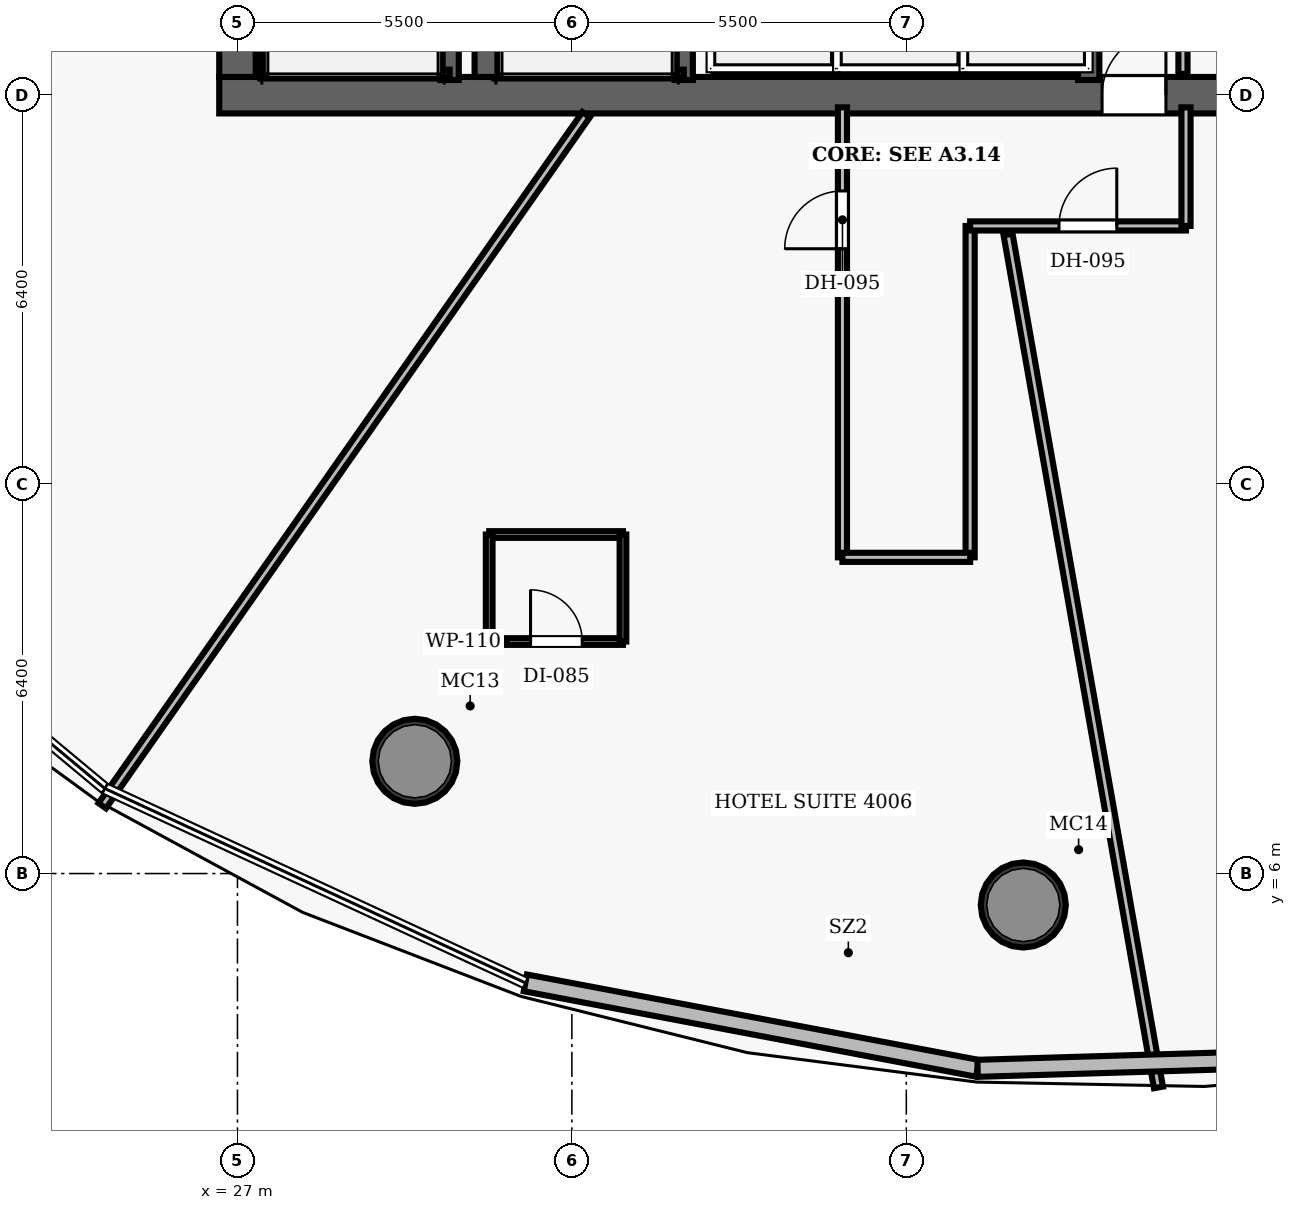
"""IFC4 building model, lengths in metres.
Left out: names, types, materials, properties, quantities, classifications, styles, units other than length and angle.
Written with IfcOpenShell. Run it as: python <this file> out.ifc"""

import sys

from ifc_helpers import new_model, si_unit, direction, frame, frame_2d, origin, origin_2d, place, context, subcontext, project, spatial, rectangle, hollow_circle, extrude, element, fill, save


model = new_model("IFC4")
c1 = context("Model", 3, precision=1e-05, world=origin(), true_north=direction((0.0, 1.0)))
c2 = subcontext(c1, "Body", "Model", "MODEL_VIEW")
j1 = project(units=[si_unit("LENGTHUNIT", "METRE"), si_unit("PLANEANGLEUNIT", "RADIAN")], contexts=[c1])
p1 = place(None, origin())
s1 = spatial("IfcSite", under=j1, at=p1, CompositionType="ELEMENT")
p2 = place(p1, origin())
s2 = spatial("IfcBuilding", under=s1, at=p2, CompositionType="ELEMENT")
p3 = place(p2, frame((0.0, 0.0, 158.8)))
s3 = spatial("IfcBuildingStorey", under=s2, at=p3, CompositionType="ELEMENT", Elevation=158.8)
p4 = place(p3, frame((26.7, 18.8, 0.0), z_axis=(0.0, 0.0, 1.0), x_axis=(1.0, 0.0, 0.0)))
e1 = element("IfcWall", 1, at=p4, inside=s3, PredefinedType="SHEAR", context=c2, shape_type="SweptSolid", body=[
    extrude(rectangle(XDim=22.6, YDim=0.6, at=frame_2d((11.3, 0.0))), origin(), (0.0, 0.0, 1.0), 3.5),
])
p5 = place(p4, frame((14.52, 0.0, 0.0)))
e2 = element("IfcOpeningElement", 2, at=p5, cuts=e1, PredefinedType="OPENING", context=c2, shape_type="SweptSolid", body=[
    extrude(rectangle(XDim=1.05, YDim=2.15, at=frame_2d((0.525, 1.075))), frame((0.0, 0.31, 0.0), z_axis=(0.0, -1.0, 0.0), x_axis=(1.0, 0.0, 0.0)), (0.0, 0.0, 1.0), 0.62),
])
p6 = place(p3, frame((27.0, 19.1, 0.0), z_axis=(0.0, 0.0, 1.0), x_axis=(0.0, 1.0, 0.0)))
e3 = element("IfcWall", 3, at=p6, inside=s3, PredefinedType="SHEAR", context=c2, shape_type="SweptSolid", body=[
    extrude(rectangle(XDim=13.8, YDim=0.6, at=frame_2d((6.9, 0.0))), origin(), (0.0, 0.0, 1.0), 3.5),
])
p7 = place(p6, frame((8.2, 0.0, 0.0)))
e4 = element("IfcOpeningElement", 4, at=p7, cuts=e3, PredefinedType="OPENING", context=c2, shape_type="SweptSolid", body=[
    extrude(rectangle(XDim=1.05, YDim=2.15, at=frame_2d((0.525, 1.075))), frame((0.0, 0.31, 0.0), z_axis=(0.0, -1.0, 0.0), x_axis=(1.0, 0.0, 0.0)), (0.0, 0.0, 1.0), 0.62),
])
p8 = place(p3, frame((31.1, 19.1, 0.0), z_axis=(0.0, 0.0, 1.0), x_axis=(0.0, 1.0, 0.0)))
e5 = element("IfcWall", 5, at=p8, inside=s3, PredefinedType="SHEAR", context=c2, shape_type="SweptSolid", body=[
    extrude(rectangle(XDim=13.8, YDim=0.4, at=frame_2d((6.9, 0.0))), origin(), (0.0, 0.0, 1.0), 3.5),
])
for number, where, z_axis, x_axis in (
    (6, (29.917, 7.846, 0.0), (0.0, 0.0, 1.0), (1.0, 0.0, 0.0)),
    (7, (39.924, 5.483, 0.0), (0.0, 0.0, 1.0), (1.0, 0.0, 0.0)),
):
    element("IfcColumn", number, at=place(p3, frame(where, z_axis=z_axis, x_axis=x_axis)), inside=s3, PredefinedType="COLUMN", context=c2, shape_type="SweptSolid", body=[
        extrude(hollow_circle(Radius=0.7, WallThickness=0.055, at=origin_2d()), origin(), (0.0, 0.0, 1.0), 3.5),
    ])
p9 = place(p3, frame((30.49, 19.05, 0.0), z_axis=(0.0, 0.0, 1.0), x_axis=(0.0, 1.0, 0.0)))
e8 = element("IfcWall", 8, at=p9, inside=s3, PredefinedType="SHEAR", context=c2, shape_type="SweptSolid", body=[
    extrude(rectangle(XDim=7.5, YDim=0.3, at=frame_2d((3.75, 0.0))), origin(), (0.0, 0.0, 1.0), 3.5),
])
p10 = place(p3, frame((27.395, 19.1, 0.0), z_axis=(0.0, 0.0, 1.0), x_axis=(0.0, 1.0, 0.0)))
e9 = element("IfcWall", 9, at=p10, inside=s3, PredefinedType="SHEAR", context=c2, shape_type="SweptSolid", body=[
    extrude(rectangle(XDim=7.45, YDim=0.12, at=frame_2d((3.725, 0.0))), origin(), (0.0, 0.0, 1.0), 3.5),
])
p11 = place(p3, frame((27.395, 19.16, 0.0), z_axis=(0.0, 0.0, 1.0), x_axis=(1.0, 0.0, 0.0)))
e10 = element("IfcWall", 10, at=p11, inside=s3, PredefinedType="SHEAR", context=c2, shape_type="SweptSolid", body=[
    extrude(rectangle(XDim=3.095, YDim=0.12, at=frame_2d((1.547, 0.0))), origin(), (0.0, 0.0, 1.0), 3.5),
])
p12 = place(p3, frame((34.34, 19.05, 0.0), z_axis=(0.0, 0.0, 1.0), x_axis=(0.0, 1.0, 0.0)))
e11 = element("IfcWall", 11, at=p12, inside=s3, PredefinedType="SHEAR", context=c2, shape_type="SweptSolid", body=[
    extrude(rectangle(XDim=7.5, YDim=0.3, at=frame_2d((3.75, 0.0))), origin(), (0.0, 0.0, 1.0), 3.5),
])
p13 = place(p3, frame((31.3, 19.16, 0.0), z_axis=(0.0, 0.0, 1.0), x_axis=(1.0, 0.0, 0.0)))
e12 = element("IfcWall", 12, at=p13, inside=s3, PredefinedType="SHEAR", context=c2, shape_type="SweptSolid", body=[
    extrude(rectangle(XDim=3.04, YDim=0.12, at=frame_2d((1.52, 0.0))), origin(), (0.0, 0.0, 1.0), 3.5),
])
p14 = place(p3, frame((41.0, 19.05, 0.0), z_axis=(0.0, 0.0, 1.0), x_axis=(0.0, 1.0, 0.0)))
e13 = element("IfcWall", 13, at=p14, inside=s3, PredefinedType="SHEAR", context=c2, shape_type="SweptSolid", body=[
    extrude(rectangle(XDim=2.08, YDim=0.35, at=frame_2d((1.04, 0.0))), origin(), (0.0, 0.0, 1.0), 2.675),
])
p15 = place(p3, frame((42.55, 19.15, 0.0), z_axis=(0.0, 0.0, 1.0), x_axis=(0.0, 1.0, 0.0)))
e14 = element("IfcWall", 14, at=p15, inside=s3, PredefinedType="PARTITIONING", context=c2, shape_type="SweptSolid", body=[
    extrude(rectangle(XDim=2.75, YDim=0.15, at=frame_2d((1.375, 0.0))), origin(), (0.0, 0.0, 1.0), 2.675),
])
p16 = place(p15, frame((0.7, 0.0, 0.0)))
e15 = element("IfcOpeningElement", 15, at=p16, cuts=e14, PredefinedType="OPENING", context=c2, shape_type="SweptSolid", body=[
    extrude(rectangle(XDim=0.85, YDim=2.1, at=frame_2d((0.425, 1.05))), frame((0.0, 0.085, 0.0), z_axis=(0.0, -1.0, 0.0), x_axis=(1.0, 0.0, 0.0)), (0.0, 0.0, 1.0), 0.17),
])
p17 = place(p3, frame((36.95, 11.2, 0.0), z_axis=(0.0, 0.0, 1.0), x_axis=(0.0, 1.0, 0.0)))
e16 = element("IfcWall", 16, at=p17, inside=s3, PredefinedType="PARTITIONING", context=c2, shape_type="SweptSolid", body=[
    extrude(rectangle(XDim=7.4, YDim=0.15, at=frame_2d((3.7, 0.0))), origin(), (0.0, 0.0, 1.0), 2.675),
])
p18 = place(p17, frame((5.075, 0.0, 0.0)))
e17 = element("IfcOpeningElement", 17, at=p18, cuts=e16, PredefinedType="OPENING", context=c2, shape_type="SweptSolid", body=[
    extrude(rectangle(XDim=0.95, YDim=2.15, at=frame_2d((0.475, 1.075))), frame((0.0, 0.085, 0.0), z_axis=(0.0, -1.0, 0.0), x_axis=(1.0, 0.0, 0.0)), (0.0, 0.0, 1.0), 0.17),
])
p19 = place(p3, frame((39.05, 11.2, 0.0), z_axis=(0.0, 0.0, 1.0), x_axis=(0.0, 1.0, 0.0)))
e18 = element("IfcWall", 18, at=p19, inside=s3, PredefinedType="PARTITIONING", context=c2, shape_type="SweptSolid", body=[
    extrude(rectangle(XDim=5.45, YDim=0.15, at=frame_2d((2.725, 0.0))), origin(), (0.0, 0.0, 1.0), 2.675),
])
p20 = place(p3, frame((39.05, 16.65, 0.0), z_axis=(0.0, 0.0, 1.0), x_axis=(1.0, 0.0, 0.0)))
e19 = element("IfcWall", 19, at=p20, inside=s3, PredefinedType="PARTITIONING", context=c2, shape_type="SweptSolid", body=[
    extrude(rectangle(XDim=3.55, YDim=0.15, at=frame_2d((1.775, 0.0))), origin(), (0.0, 0.0, 1.0), 2.675),
])
p21 = place(p20, frame((1.462, 0.0, 0.0)))
e20 = element("IfcOpeningElement", 20, at=p21, cuts=e19, PredefinedType="OPENING", context=c2, shape_type="SweptSolid", body=[
    extrude(rectangle(XDim=0.95, YDim=2.15, at=frame_2d((0.475, 1.075))), frame((0.0, 0.085, 0.0), z_axis=(0.0, -1.0, 0.0), x_axis=(1.0, 0.0, 0.0)), (0.0, 0.0, 1.0), 0.17),
])
p22 = place(p3, frame((42.6, 16.65, 0.0), z_axis=(0.0, 0.0, 1.0), x_axis=(0.0, 1.0, 0.0)))
e21 = element("IfcWall", 21, at=p22, inside=s3, PredefinedType="PARTITIONING", context=c2, shape_type="SweptSolid", body=[
    extrude(rectangle(XDim=1.95, YDim=0.15, at=frame_2d((0.975, 0.0))), origin(), (0.0, 0.0, 1.0), 2.675),
])
p23 = place(p3, frame((36.95, 11.2, 0.0), z_axis=(0.0, 0.0, 1.0), x_axis=(1.0, 0.0, 0.0)))
e22 = element("IfcWall", 22, at=p23, inside=s3, PredefinedType="PARTITIONING", context=c2, shape_type="SweptSolid", body=[
    extrude(rectangle(XDim=2.1, YDim=0.15, at=frame_2d((1.05, 0.0))), origin(), (0.0, 0.0, 1.0), 2.675),
])
p24 = place(p3, frame((32.734, 18.48, 0.0), z_axis=(0.0, 0.0, 1.0), x_axis=(-0.573572172443, -0.819155029893, 0.0)))
e23 = element("IfcWall", 23, at=p24, inside=s3, PredefinedType="PARTITIONING", context=c2, shape_type="SweptSolid", body=[
    extrude(rectangle(XDim=13.874, YDim=0.15, at=frame_2d((6.937, 0.0))), origin(), (0.0, 0.0, 1.0), 2.675),
])
p25 = place(p3, frame((39.673, 16.51, 0.0), z_axis=(0.0, 0.0, 1.0), x_axis=(0.173644531714, -0.984808395885, 0.0)))
e24 = element("IfcWall", 24, at=p25, inside=s3, PredefinedType="PARTITIONING", context=c2, shape_type="SweptSolid", body=[
    extrude(rectangle(XDim=14.244, YDim=0.15, at=frame_2d((7.122, 0.0))), origin(), (0.0, 0.0, 1.0), 2.675),
])
p26 = place(p3, frame((31.14, 9.815, 0.0), z_axis=(0.0, 0.0, 1.0), x_axis=(1.0, 0.0, 0.0)))
e25 = element("IfcWall", 25, at=p26, inside=s3, PredefinedType="PARTITIONING", context=c2, shape_type="SweptSolid", body=[
    extrude(rectangle(XDim=2.2, YDim=0.11, at=frame_2d((1.1, 0.0))), origin(), (0.0, 0.0, 1.0), 2.675),
])
p27 = place(p26, frame((0.68, 0.0, 0.0)))
e26 = element("IfcOpeningElement", 26, at=p27, cuts=e25, PredefinedType="OPENING", context=c2, shape_type="SweptSolid", body=[
    extrude(rectangle(XDim=0.85, YDim=2.1, at=frame_2d((0.425, 1.05))), frame((0.0, 0.065, 0.0), z_axis=(0.0, -1.0, 0.0), x_axis=(1.0, 0.0, 0.0)), (0.0, 0.0, 1.0), 0.13),
])
p28 = place(p3, frame((31.14, 11.575, 0.0), z_axis=(0.0, 0.0, 1.0), x_axis=(1.0, 0.0, 0.0)))
e27 = element("IfcWall", 27, at=p28, inside=s3, PredefinedType="PARTITIONING", context=c2, shape_type="SweptSolid", body=[
    extrude(rectangle(XDim=2.2, YDim=0.11, at=frame_2d((1.1, 0.0))), origin(), (0.0, 0.0, 1.0), 2.675),
])
for number, where, z_axis, x_axis in (
    (28, (31.14, 9.815, 0.0), (0.0, 0.0, 1.0), (0.0, 1.0, 0.0)),
    (29, (33.34, 9.815, 0.0), (0.0, 0.0, 1.0), (0.0, 1.0, 0.0)),
):
    element("IfcWall", number, at=place(p3, frame(where, z_axis=z_axis, x_axis=x_axis)), inside=s3, PredefinedType="PARTITIONING", context=c2, shape_type="SweptSolid", body=[
        extrude(rectangle(XDim=1.76, YDim=0.11, at=frame_2d((0.88, 0.0))), origin(), (0.0, 0.0, 1.0), 2.675),
    ])
p29 = place(p3, frame((39.173, 2.797, 0.0), z_axis=(0.0, 0.0, 1.0), x_axis=(-0.982615276767, 0.185653488694, 0.0)))
e30 = element("IfcWall", 30, at=p29, inside=s3, PredefinedType="SOLIDWALL", context=c2, shape_type="SweptSolid", body=[
    extrude(rectangle(XDim=7.569, YDim=0.28, at=frame_2d((3.785, 0.0))), origin(), (0.0, 0.0, 1.0), 3.26),
])
p30 = place(p3, frame((46.461, 3.016, 0.0), z_axis=(0.0, 0.0, 1.0), x_axis=(-0.999546874855, -0.030100580863, 0.0)))
e31 = element("IfcWall", 31, at=p30, inside=s3, PredefinedType="SOLIDWALL", context=c2, shape_type="SweptSolid", body=[
    extrude(rectangle(XDim=7.292, YDim=0.28, at=frame_2d((3.646, 0.0))), origin(), (0.0, 0.0, 1.0), 3.26),
])
p31 = place(p5, origin())
e32 = element("IfcDoor", 32, at=p31, inside=s3, OperationType="SINGLE_SWING_RIGHT", PredefinedType="DOOR", context=c2, shape_type="SweptSolid", body=[
    extrude(rectangle(XDim=1.05, YDim=2.15, at=frame_2d((0.525, 1.075))), frame((0.0, 0.025, 0.0), z_axis=(0.0, -1.0, 0.0), x_axis=(1.0, 0.0, 0.0)), (0.0, 0.0, 1.0), 0.05),
])
fill(e2, e32)
p32 = place(p18, origin())
e33 = element("IfcDoor", 33, at=p32, inside=s3, OperationType="SINGLE_SWING_LEFT", PredefinedType="DOOR", context=c2, shape_type="SweptSolid", body=[
    extrude(rectangle(XDim=0.95, YDim=2.15, at=frame_2d((0.475, 1.075))), frame((0.0, 0.025, 0.0), z_axis=(0.0, -1.0, 0.0), x_axis=(1.0, 0.0, 0.0)), (0.0, 0.0, 1.0), 0.05),
])
fill(e17, e33)
p33 = place(p27, origin())
e34 = element("IfcDoor", 34, at=p33, inside=s3, OperationType="SINGLE_SWING_LEFT", PredefinedType="DOOR", context=c2, shape_type="SweptSolid", body=[
    extrude(rectangle(XDim=0.85, YDim=2.1, at=frame_2d((0.425, 1.05))), frame((0.0, 0.025, 0.0), z_axis=(0.0, -1.0, 0.0), x_axis=(1.0, 0.0, 0.0)), (0.0, 0.0, 1.0), 0.05),
])
fill(e26, e34)
p34 = place(p21, origin())
e35 = element("IfcDoor", 35, at=p34, inside=s3, OperationType="SINGLE_SWING_RIGHT", PredefinedType="DOOR", context=c2, shape_type="SweptSolid", body=[
    extrude(rectangle(XDim=0.95, YDim=2.15, at=frame_2d((0.475, 1.075))), frame((0.0, 0.025, 0.0), z_axis=(0.0, -1.0, 0.0), x_axis=(1.0, 0.0, 0.0)), (0.0, 0.0, 1.0), 0.05),
])
fill(e20, e35)
save(model, sys.argv[1])
